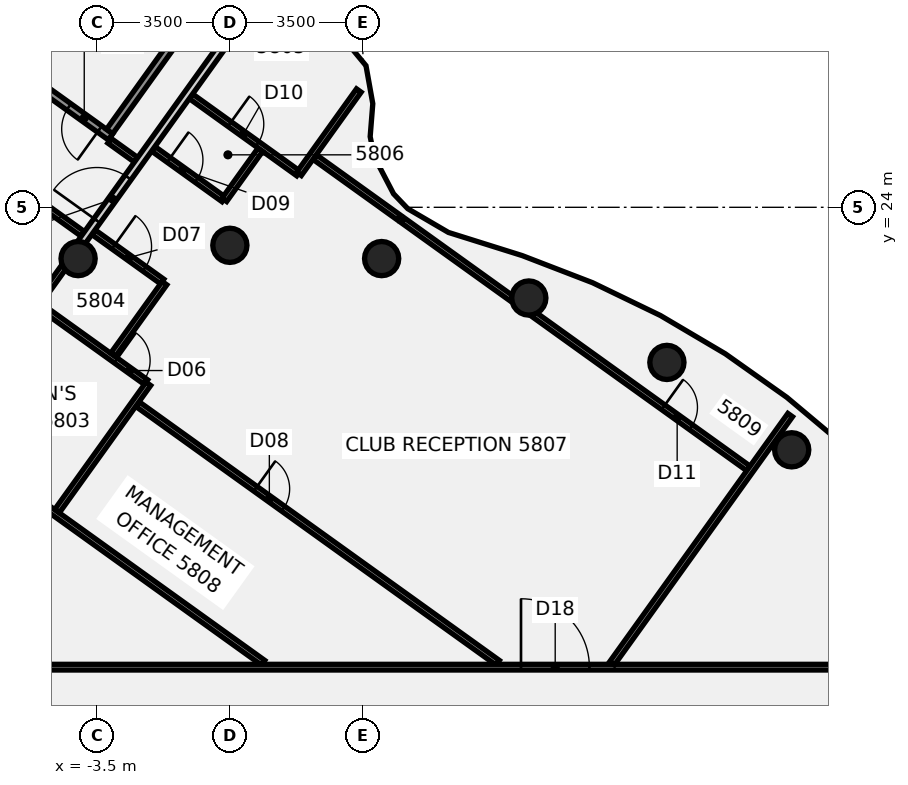
"""IFC4 building model, lengths in metres.
Left out: names, types, materials, properties, quantities, classifications, styles, units other than length and angle.
Written with IfcOpenShell. Run it as: python <this file> out.ifc"""

import sys

from ifc_helpers import new_model, si_unit, direction, frame, frame_2d, origin, origin_2d, place, context, subcontext, project, spatial, rectangle, circle, extrude, element, fill, save


model = new_model("IFC4")
c1 = context("Model", 3, precision=1e-05, world=origin(), true_north=direction((0.0, 1.0)))
c2 = subcontext(c1, "Body", "Model", "MODEL_VIEW")
j1 = project(units=[si_unit("LENGTHUNIT", "METRE"), si_unit("PLANEANGLEUNIT", "RADIAN")], contexts=[c1])
p1 = place(None, origin())
s1 = spatial("IfcSite", under=j1, at=p1, CompositionType="ELEMENT")
p2 = place(p1, origin())
s2 = spatial("IfcBuilding", under=s1, at=p2, CompositionType="ELEMENT")
p3 = place(p2, frame((0.0, 0.0, 230.7)))
s3 = spatial("IfcBuildingStorey", under=s2, at=p3, CompositionType="ELEMENT", Elevation=230.7)
for number, where, z_axis, x_axis in (
    (1, (14.784, 17.619, -0.14), (0.0, 0.0, 1.0), (1.0, 0.0, 0.0)),
    (2, (11.5, 19.919, -0.14), (0.0, 0.0, 1.0), (1.0, 0.0, 0.0)),
    (3, (7.866, 21.613, -0.14), (0.0, 0.0, 1.0), (1.0, 0.0, 0.0)),
    (4, (3.994, 22.651, -0.14), (0.0, 0.0, 1.0), (1.0, 0.0, 0.0)),
    (5, (0.0, 23.0, -0.14), (0.0, 0.0, 1.0), (1.0, 0.0, 0.0)),
    (6, (-3.994, 22.651, -0.14), (0.0, 0.0, 1.0), (1.0, 0.0, 0.0)),
):
    element("IfcColumn", number, at=place(p3, frame(where, z_axis=z_axis, x_axis=x_axis)), inside=s3, PredefinedType="COLUMN", context=c2, shape_type="SweptSolid", body=[
        extrude(circle(Radius=0.45, at=origin_2d()), origin(), (0.0, 0.0, 1.0), 3.6),
    ])
p4 = place(p3, frame((-13.291, 22.185, 0.0), z_axis=(0.0, 0.0, 1.0), x_axis=(0.812381382917, -0.583126477439, 0.0)))
e7 = element("IfcWall", 7, at=p4, inside=s3, PredefinedType="PARTITIONING", context=c2, shape_type="SweptSolid", body=[
    extrude(rectangle(XDim=17.438, YDim=0.15, at=frame_2d((8.719, 0.0))), origin(), (0.0, 0.0, 1.0), 2.864),
])
p5 = place(p3, frame((-11.033, 28.442, 0.0), z_axis=(0.0, 0.0, 1.0), x_axis=(0.812313309369, -0.58322130227, 0.0)))
e8 = element("IfcWall", 8, at=p5, inside=s3, PredefinedType="PARTITIONING", context=c2, shape_type="SweptSolid", body=[
    extrude(rectangle(XDim=8.82, YDim=0.15, at=frame_2d((4.41, 0.0))), origin(), (0.0, 0.0, 1.0), 2.864),
])
p6 = place(p5, frame((5.87, 0.0, 0.0)))
e9 = element("IfcOpeningElement", 9, at=p6, cuts=e8, PredefinedType="OPENING", context=c2, shape_type="SweptSolid", body=[
    extrude(rectangle(XDim=0.9, YDim=2.1, at=frame_2d((0.45, 1.05))), frame((0.0, 0.085, 0.0), z_axis=(0.0, -1.0, 0.0), x_axis=(1.0, 0.0, 0.0)), (0.0, 0.0, 1.0), 0.17),
])
p7 = place(p3, frame((-3.167, 25.751, 0.0), z_axis=(0.0, 0.0, 1.0), x_axis=(0.812351297047, -0.583168389221, 0.0)))
e10 = element("IfcWall", 10, at=p7, inside=s3, PredefinedType="PARTITIONING", context=c2, shape_type="SweptSolid", body=[
    extrude(rectangle(XDim=0.861, YDim=0.15, at=frame_2d((0.43, 0.0))), origin(), (0.0, 0.0, 1.0), 2.864),
])
p8 = place(p3, frame((-5.005, 21.407, 0.0), z_axis=(0.0, 0.0, 1.0), x_axis=(0.812433901196, -0.583053304757, 0.0)))
e11 = element("IfcWall", 11, at=p8, inside=s3, PredefinedType="PARTITIONING", context=c2, shape_type="SweptSolid", body=[
    extrude(rectangle(XDim=3.445, YDim=0.15, at=frame_2d((1.723, 0.0))), origin(), (0.0, 0.0, 1.0), 2.864),
])
p9 = place(p8, frame((2.47, 0.0, 0.0)))
e12 = element("IfcOpeningElement", 12, at=p9, cuts=e11, PredefinedType="OPENING", context=c2, shape_type="SweptSolid", body=[
    extrude(rectangle(XDim=0.9, YDim=2.1, at=frame_2d((0.45, 1.05))), frame((0.0, 0.085, 0.0), z_axis=(0.0, -1.0, 0.0), x_axis=(1.0, 0.0, 0.0)), (0.0, 0.0, 1.0), 0.17),
])
p10 = place(p3, frame((-3.589, 23.345, 0.0), z_axis=(0.0, 0.0, 1.0), x_axis=(0.812463673424, -0.583011817518, 0.0)))
e13 = element("IfcWall", 13, at=p10, inside=s3, PredefinedType="PARTITIONING", context=c2, shape_type="SweptSolid", body=[
    extrude(rectangle(XDim=2.225, YDim=0.15, at=frame_2d((1.112, 0.0))), origin(), (0.0, 0.0, 1.0), 2.864),
])
p11 = place(p10, frame((0.65, 0.0, 0.0)))
e14 = element("IfcOpeningElement", 14, at=p11, cuts=e13, PredefinedType="OPENING", context=c2, shape_type="SweptSolid", body=[
    extrude(rectangle(XDim=1.0, YDim=2.1, at=frame_2d((0.5, 1.05))), frame((0.0, 0.085, 0.0), z_axis=(0.0, -1.0, 0.0), x_axis=(1.0, 0.0, 0.0)), (0.0, 0.0, 1.0), 0.17),
])
p12 = place(p3, frame((-2.43, 18.82, 0.0), z_axis=(0.0, 0.0, 1.0), x_axis=(0.812379650035, -0.583128891592, 0.0)))
e15 = element("IfcWall", 15, at=p12, inside=s3, PredefinedType="PARTITIONING", context=c2, shape_type="SweptSolid", body=[
    extrude(rectangle(XDim=11.667, YDim=0.15, at=frame_2d((5.834, 0.0))), origin(), (0.0, 0.0, 1.0), 2.864),
])
p13 = place(p12, frame((3.82, 0.0, 0.0)))
e16 = element("IfcOpeningElement", 16, at=p13, cuts=e15, PredefinedType="OPENING", context=c2, shape_type="SweptSolid", body=[
    extrude(rectangle(XDim=0.9, YDim=2.1, at=frame_2d((0.45, 1.05))), frame((0.0, 0.085, 0.0), z_axis=(0.0, -1.0, 0.0), x_axis=(1.0, 0.0, 0.0)), (0.0, 0.0, 1.0), 0.17),
])
p14 = place(p3, frame((-2.015, 25.539, 0.0), z_axis=(0.0, 0.0, 1.0), x_axis=(0.812349738906, -0.583170559699, 0.0)))
e17 = element("IfcWall", 17, at=p14, inside=s3, PredefinedType="PARTITIONING", context=c2, shape_type="SweptSolid", body=[
    extrude(rectangle(XDim=2.281, YDim=0.15, at=frame_2d((1.14, 0.0))), origin(), (0.0, 0.0, 1.0), 2.864),
])
p15 = place(p14, frame((0.5, 0.0, 0.0)))
e18 = element("IfcOpeningElement", 18, at=p15, cuts=e17, PredefinedType="OPENING", context=c2, shape_type="SweptSolid", body=[
    extrude(rectangle(XDim=0.9, YDim=2.1, at=frame_2d((0.45, 1.05))), frame((0.0, 0.085, 0.0), z_axis=(0.0, -1.0, 0.0), x_axis=(1.0, 0.0, 0.0)), (0.0, 0.0, 1.0), 0.17),
])
p16 = place(p3, frame((-1.023, 26.92, 0.0), z_axis=(0.0, 0.0, 1.0), x_axis=(0.812175386304, -0.583413354219, 0.0)))
e19 = element("IfcWall", 19, at=p16, inside=s3, PredefinedType="PARTITIONING", context=c2, shape_type="SweptSolid", body=[
    extrude(rectangle(XDim=3.479, YDim=0.15, at=frame_2d((1.74, 0.0))), origin(), (0.0, 0.0, 1.0), 2.864),
])
p17 = place(p16, frame((1.25, 0.0, 0.0)))
e20 = element("IfcOpeningElement", 20, at=p17, cuts=e19, PredefinedType="OPENING", context=c2, shape_type="SweptSolid", body=[
    extrude(rectangle(XDim=0.9, YDim=2.1, at=frame_2d((0.45, 1.05))), frame((0.0, 0.085, 0.0), z_axis=(0.0, -1.0, 0.0), x_axis=(1.0, 0.0, 0.0)), (0.0, 0.0, 1.0), 0.17),
])
p18 = place(p3, frame((2.235, 25.319, 0.0), z_axis=(0.0, 0.0, 1.0), x_axis=(0.812367323753, -0.583146063434, 0.0)))
e21 = element("IfcWall", 21, at=p18, inside=s3, PredefinedType="PARTITIONING", context=c2, shape_type="SweptSolid", body=[
    extrude(rectangle(XDim=2.721, YDim=0.15, at=frame_2d((1.361, 0.0))), origin(), (0.0, 0.0, 1.0), 2.864),
])
p19 = place(p3, frame((4.547, 23.66, 0.0), z_axis=(0.0, 0.0, 1.0), x_axis=(0.812386891105, -0.583118803642, 0.0)))
e22 = element("IfcWall", 22, at=p19, inside=s3, PredefinedType="PARTITIONING", context=c2, shape_type="SweptSolid", body=[
    extrude(rectangle(XDim=3.521, YDim=0.15, at=frame_2d((1.761, 0.0))), origin(), (0.0, 0.0, 1.0), 2.864),
])
p20 = place(p3, frame((7.993, 21.187, 0.0), z_axis=(0.0, 0.0, 1.0), x_axis=(0.81239794632, -0.583103401478, 0.0)))
e23 = element("IfcWall", 23, at=p20, inside=s3, PredefinedType="PARTITIONING", context=c2, shape_type="SweptSolid", body=[
    extrude(rectangle(XDim=6.953, YDim=0.15, at=frame_2d((3.477, 0.0))), origin(), (0.0, 0.0, 1.0), 2.864),
])
p21 = place(p20, frame((4.2, 0.0, 0.0)))
e24 = element("IfcOpeningElement", 24, at=p21, cuts=e23, PredefinedType="OPENING", context=c2, shape_type="SweptSolid", body=[
    extrude(rectangle(XDim=0.9, YDim=2.1, at=frame_2d((0.45, 1.05))), frame((0.0, 0.085, 0.0), z_axis=(0.0, -1.0, 0.0), x_axis=(1.0, 0.0, 0.0)), (0.0, 0.0, 1.0), 0.17),
])
p22 = place(p3, frame((-17.065, 11.9, 0.0), z_axis=(0.0, 0.0, 1.0), x_axis=(1.0, 0.0, 0.0)))
e25 = element("IfcWall", 25, at=p22, inside=s3, PredefinedType="PARTITIONING", context=c2, shape_type="SweptSolid", body=[
    extrude(rectangle(XDim=34.165, YDim=0.15, at=frame_2d((17.083, 0.0))), origin(), (0.0, 0.0, 1.0), 2.864),
])
p23 = place(p22, frame((24.726, 0.0, 0.0)))
e26 = element("IfcOpeningElement", 26, at=p23, cuts=e25, PredefinedType="OPENING", context=c2, shape_type="SweptSolid", body=[
    extrude(rectangle(XDim=1.8, YDim=2.1, at=frame_2d((0.9, 1.05))), frame((0.0, 0.085, 0.0), z_axis=(0.0, -1.0, 0.0), x_axis=(1.0, 0.0, 0.0)), (0.0, 0.0, 1.0), 0.17),
])
p24 = place(p22, frame((9.395, 0.0, 0.0)))
e27 = element("IfcOpeningElement", 27, at=p24, cuts=e25, PredefinedType="OPENING", context=c2, shape_type="SweptSolid", body=[
    extrude(rectangle(XDim=1.8, YDim=2.1, at=frame_2d((0.9, 1.05))), frame((0.0, 0.085, 0.0), z_axis=(0.0, -1.0, 0.0), x_axis=(1.0, 0.0, 0.0)), (0.0, 0.0, 1.0), 0.17),
])
p25 = place(p22, frame((2.645, 0.0, 0.0)))
e28 = element("IfcOpeningElement", 28, at=p25, cuts=e25, PredefinedType="OPENING", context=c2, shape_type="SweptSolid", body=[
    extrude(rectangle(XDim=1.8, YDim=2.1, at=frame_2d((0.9, 1.05))), frame((0.0, 0.085, 0.0), z_axis=(0.0, -1.0, 0.0), x_axis=(1.0, 0.0, 0.0)), (0.0, 0.0, 1.0), 0.17),
])
p26 = place(p3, frame((-7.472, 18.107, 0.0), z_axis=(0.0, 0.0, 1.0), x_axis=(0.583113446938, 0.812390736038, 0.0)))
e29 = element("IfcWall", 29, at=p26, inside=s3, PredefinedType="PARTITIONING", context=c2, shape_type="SweptSolid", body=[
    extrude(rectangle(XDim=5.488, YDim=0.15, at=frame_2d((2.744, 0.0))), origin(), (0.0, 0.0, 1.0), 2.864),
])
p27 = place(p3, frame((-4.01, 22.931, 0.0), z_axis=(0.0, 0.0, 1.0), x_axis=(0.58311350021, 0.8123906978, 0.0)))
e30 = element("IfcWall", 30, at=p27, inside=s3, PredefinedType="PARTITIONING", context=c2, shape_type="SweptSolid", body=[
    extrude(rectangle(XDim=8.281, YDim=0.2, at=frame_2d((4.141, 0.0))), origin(), (0.0, 0.0, 1.0), 2.864),
])
p28 = place(p27, frame((0.882, 0.0, 0.0)))
e31 = element("IfcOpeningElement", 31, at=p28, cuts=e30, PredefinedType="OPENING", context=c2, shape_type="SweptSolid", body=[
    extrude(rectangle(XDim=1.4, YDim=2.1, at=frame_2d((0.7, 1.05))), frame((0.0, 0.11, 0.0), z_axis=(0.0, -1.0, 0.0), x_axis=(1.0, 0.0, 0.0)), (0.0, 0.0, 1.0), 0.22),
])
p29 = place(p3, frame((-4.547, 16.007, 0.0), z_axis=(0.0, 0.0, 1.0), x_axis=(0.583002261938, 0.812470530281, 0.0)))
e32 = element("IfcWall", 32, at=p29, inside=s3, PredefinedType="PARTITIONING", context=c2, shape_type="SweptSolid", body=[
    extrude(rectangle(XDim=4.121, YDim=0.15, at=frame_2d((2.06, 0.0))), origin(), (0.0, 0.0, 1.0), 2.864),
])
p30 = place(p3, frame((1.82, 24.879, 0.0), z_axis=(0.0, 0.0, 1.0), x_axis=(0.583041539886, 0.812442344273, 0.0)))
e33 = element("IfcWall", 33, at=p30, inside=s3, PredefinedType="PARTITIONING", context=c2, shape_type="SweptSolid", body=[
    extrude(rectangle(XDim=2.7, YDim=0.15, at=frame_2d((1.35, 0.0))), origin(), (0.0, 0.0, 1.0), 2.864),
])
p31 = place(p3, frame((-3.073, 20.12, 0.0), z_axis=(0.0, 0.0, 1.0), x_axis=(0.58343649738, 0.812158761281, 0.0)))
e34 = element("IfcWall", 34, at=p31, inside=s3, PredefinedType="PARTITIONING", context=c2, shape_type="SweptSolid", body=[
    extrude(rectangle(XDim=2.32, YDim=0.15, at=frame_2d((1.16, 0.0))), origin(), (0.0, 0.0, 1.0), 2.864),
])
p32 = place(p3, frame((-0.145, 24.196, 0.0), z_axis=(0.0, 0.0, 1.0), x_axis=(0.583403115634, 0.812182740933, 0.0)))
e35 = element("IfcWall", 35, at=p32, inside=s3, PredefinedType="PARTITIONING", context=c2, shape_type="SweptSolid", body=[
    extrude(rectangle(XDim=1.62, YDim=0.15, at=frame_2d((0.81, 0.0))), origin(), (0.0, 0.0, 1.0), 2.864),
])
p33 = place(p3, frame((10.057, 12.002, 0.0), z_axis=(0.0, 0.0, 1.0), x_axis=(0.583075235696, 0.812418161736, 0.0)))
e36 = element("IfcWall", 36, at=p33, inside=s3, PredefinedType="PARTITIONING", context=c2, shape_type="SweptSolid", body=[
    extrude(rectangle(XDim=8.039, YDim=0.15, at=frame_2d((4.02, 0.0))), origin(), (0.0, 0.0, 1.0), 2.864),
])
p34 = place(p3, frame((-3.141, 25.855, -0.14), z_axis=(0.0, 0.0, 1.0), x_axis=(-0.812387025154, 0.583118616889, 0.0)))
e37 = element("IfcWall", 37, at=p34, inside=s3, PredefinedType="SHEAR", context=c2, shape_type="SweptSolid", body=[
    extrude(rectangle(XDim=6.7, YDim=0.2, at=frame_2d((3.35, 0.0))), origin(), (0.0, 0.0, 1.0), 3.004),
])
p35 = place(p34, frame((0.35, 0.0, 0.0)))
e38 = element("IfcOpeningElement", 38, at=p35, cuts=e37, PredefinedType="OPENING", context=c2, shape_type="SweptSolid", body=[
    extrude(rectangle(XDim=1.0, YDim=2.1, at=frame_2d((0.5, 1.05))), frame((0.0, 0.11, 0.0), z_axis=(0.0, -1.0, 0.0), x_axis=(1.0, 0.0, 0.0)), (0.0, 0.0, 1.0), 0.22),
])
p36 = place(p3, frame((-1.298, 28.594, -0.14), z_axis=(0.0, 0.0, 1.0), x_axis=(-0.583120290408, -0.812385823925, 0.0)))
e39 = element("IfcWall", 39, at=p36, inside=s3, PredefinedType="SHEAR", context=c2, shape_type="SweptSolid", body=[
    extrude(rectangle(XDim=3.2, YDim=0.2, at=frame_2d((1.6, 0.0))), origin(), (0.0, 0.0, 1.0), 3.6),
])
p37 = place(p9, frame((0.9, 0.0, 0.0), z_axis=(0.0, 0.0, 1.0), x_axis=(-1.0, 0.0, 0.0)))
e40 = element("IfcDoor", 40, at=p37, inside=s3, OperationType="SINGLE_SWING_RIGHT", PredefinedType="DOOR", context=c2, shape_type="SweptSolid", body=[
    extrude(rectangle(XDim=0.9, YDim=2.1, at=frame_2d((0.45, 1.05))), frame((0.0, 0.025, 0.0), z_axis=(0.0, -1.0, 0.0), x_axis=(1.0, 0.0, 0.0)), (0.0, 0.0, 1.0), 0.05),
])
fill(e12, e40)
p38 = place(p11, frame((1.0, 0.0, 0.0), z_axis=(0.0, 0.0, 1.0), x_axis=(-1.0, 0.0, 0.0)))
e41 = element("IfcDoor", 41, at=p38, inside=s3, OperationType="SINGLE_SWING_RIGHT", PredefinedType="DOOR", context=c2, shape_type="SweptSolid", body=[
    extrude(rectangle(XDim=1.0, YDim=2.1, at=frame_2d((0.5, 1.05))), frame((0.0, 0.025, 0.0), z_axis=(0.0, -1.0, 0.0), x_axis=(1.0, 0.0, 0.0)), (0.0, 0.0, 1.0), 0.05),
])
fill(e14, e41)
p39 = place(p13, frame((0.9, 0.0, 0.0), z_axis=(0.0, 0.0, 1.0), x_axis=(-1.0, 0.0, 0.0)))
e42 = element("IfcDoor", 42, at=p39, inside=s3, OperationType="SINGLE_SWING_LEFT", PredefinedType="DOOR", context=c2, shape_type="SweptSolid", body=[
    extrude(rectangle(XDim=0.9, YDim=2.1, at=frame_2d((0.45, 1.05))), frame((0.0, 0.025, 0.0), z_axis=(0.0, -1.0, 0.0), x_axis=(1.0, 0.0, 0.0)), (0.0, 0.0, 1.0), 0.05),
])
fill(e16, e42)
p40 = place(p15, origin())
e43 = element("IfcDoor", 43, at=p40, inside=s3, OperationType="SINGLE_SWING_RIGHT", PredefinedType="DOOR", context=c2, shape_type="SweptSolid", body=[
    extrude(rectangle(XDim=0.9, YDim=2.1, at=frame_2d((0.45, 1.05))), frame((0.0, 0.025, 0.0), z_axis=(0.0, -1.0, 0.0), x_axis=(1.0, 0.0, 0.0)), (0.0, 0.0, 1.0), 0.05),
])
fill(e18, e43)
p41 = place(p17, origin())
e44 = element("IfcDoor", 44, at=p41, inside=s3, OperationType="SINGLE_SWING_RIGHT", PredefinedType="DOOR", context=c2, shape_type="SweptSolid", body=[
    extrude(rectangle(XDim=0.9, YDim=2.1, at=frame_2d((0.45, 1.05))), frame((0.0, 0.025, 0.0), z_axis=(0.0, -1.0, 0.0), x_axis=(1.0, 0.0, 0.0)), (0.0, 0.0, 1.0), 0.05),
])
fill(e20, e44)
p42 = place(p21, origin())
e45 = element("IfcDoor", 45, at=p42, inside=s3, OperationType="SINGLE_SWING_LEFT", PredefinedType="DOOR", context=c2, shape_type="SweptSolid", body=[
    extrude(rectangle(XDim=0.9, YDim=2.1, at=frame_2d((0.45, 1.05))), frame((0.0, 0.025, 0.0), z_axis=(0.0, -1.0, 0.0), x_axis=(1.0, 0.0, 0.0)), (0.0, 0.0, 1.0), 0.05),
])
fill(e24, e45)
p43 = place(p23, frame((1.8, 0.0, 0.0), z_axis=(0.0, 0.0, 1.0), x_axis=(-1.0, 0.0, 0.0)))
e46 = element("IfcDoor", 46, at=p43, inside=s3, OperationType="DOUBLE_DOOR_SINGLE_SWING", PredefinedType="DOOR", context=c2, shape_type="SweptSolid", body=[
    extrude(rectangle(XDim=1.8, YDim=2.1, at=frame_2d((0.9, 1.05))), frame((0.0, 0.025, 0.0), z_axis=(0.0, -1.0, 0.0), x_axis=(1.0, 0.0, 0.0)), (0.0, 0.0, 1.0), 0.05),
])
fill(e26, e46)
p44 = place(p28, frame((1.4, 0.0, 0.0), z_axis=(0.0, 0.0, 1.0), x_axis=(-1.0, 0.0, 0.0)))
e47 = element("IfcDoor", 47, at=p44, inside=s3, OperationType="DOUBLE_DOOR_SINGLE_SWING", PredefinedType="DOOR", context=c2, shape_type="SweptSolid", body=[
    extrude(rectangle(XDim=1.4, YDim=2.1, at=frame_2d((0.7, 1.05))), frame((0.0, 0.025, 0.0), z_axis=(0.0, -1.0, 0.0), x_axis=(1.0, 0.0, 0.0)), (0.0, 0.0, 1.0), 0.05),
])
fill(e31, e47)
p45 = place(p35, origin())
e48 = element("IfcDoor", 48, at=p45, inside=s3, OperationType="SINGLE_SWING_LEFT", PredefinedType="DOOR", context=c2, shape_type="SweptSolid", body=[
    extrude(rectangle(XDim=1.0, YDim=2.1, at=frame_2d((0.5, 1.05))), frame((0.0, 0.025, 0.0), z_axis=(0.0, -1.0, 0.0), x_axis=(1.0, 0.0, 0.0)), (0.0, 0.0, 1.0), 0.05),
])
fill(e38, e48)
save(model, sys.argv[1])
